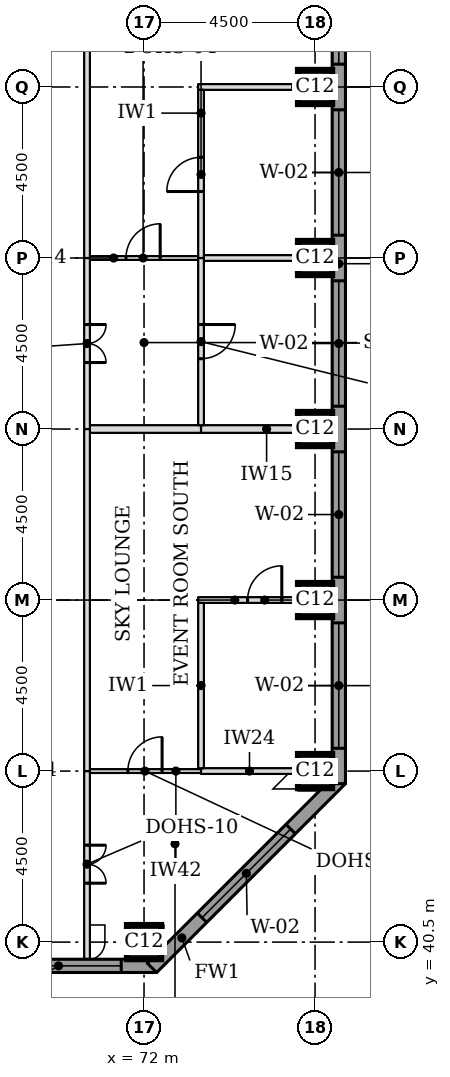
"""IFC4 building model, lengths in metres.
Left out: names, types, materials, properties, quantities, classifications, styles, units other than length and angle.
Written with IfcOpenShell. Run it as: python <this file> out.ifc"""

import sys

from ifc_helpers import new_model, si_unit, direction, frame, frame_2d, origin, origin_2d, place, context, subcontext, project, spatial, rectangle, extrude, element, fill, save


model = new_model("IFC4")
c1 = context("Model", 3, precision=1e-05, world=origin(), true_north=direction((0.0, 1.0)))
c2 = subcontext(c1, "Body", "Model", "MODEL_VIEW")
j1 = project(units=[si_unit("LENGTHUNIT", "METRE"), si_unit("PLANEANGLEUNIT", "RADIAN")], contexts=[c1])
p1 = place(None, origin())
s1 = spatial("IfcSite", under=j1, at=p1, CompositionType="ELEMENT")
p2 = place(p1, origin())
s2 = spatial("IfcBuilding", under=s1, at=p2, CompositionType="ELEMENT")
p3 = place(p2, frame((0.0, 0.0, 260.0)))
s3 = spatial("IfcBuildingStorey", under=s2, at=p3, CompositionType="ELEMENT", Elevation=260.0)
for number, where, z_axis, x_axis in (
    (1, (72.0, 40.5, 0.0), (0.0, 0.0, 1.0), (1.0, 0.0, 0.0)),
    (2, (76.5, 45.0, 0.0), (0.0, 0.0, 1.0), (1.0, 0.0, 0.0)),
    (3, (76.5, 49.5, 0.0), (0.0, 0.0, 1.0), (1.0, 0.0, 0.0)),
    (4, (76.5, 54.0, 0.0), (0.0, 0.0, 1.0), (1.0, 0.0, 0.0)),
    (5, (76.5, 58.5, 0.0), (0.0, 0.0, 1.0), (1.0, 0.0, 0.0)),
    (6, (76.5, 63.0, 0.0), (0.0, 0.0, 1.0), (1.0, 0.0, 0.0)),
):
    element("IfcColumn", number, at=place(p3, frame(where, z_axis=z_axis, x_axis=x_axis)), inside=s3, PredefinedType="COLUMN", context=c2, shape_type="SweptSolid", body=[
        extrude(rectangle(XDim=0.9, YDim=0.9, at=origin_2d()), origin(), (0.0, 0.0, 1.0), 3.7),
    ])
p4 = place(p3, frame((36.0, 39.875, 0.0), z_axis=(0.0, 0.0, 1.0), x_axis=(1.0, 0.0, 0.0)))
e7 = element("IfcWall", 7, at=p4, inside=s3, PredefinedType="STANDARD", context=c2, shape_type="SweptSolid", body=[
    extrude(rectangle(XDim=36.331, YDim=0.35, at=frame_2d((18.166, 0.0))), origin(), (0.0, 0.0, 1.0), 3.425),
])
p5 = place(p4, frame((0.6, 0.0, 0.9)))
e8 = element("IfcOpeningElement", 8, at=p5, cuts=e7, PredefinedType="OPENING", context=c2, shape_type="SweptSolid", body=[
    extrude(rectangle(XDim=3.3, YDim=1.9, at=frame_2d((1.65, 0.95))), frame((0.0, 0.185, 0.0), z_axis=(0.0, -1.0, 0.0), x_axis=(1.0, 0.0, 0.0)), (0.0, 0.0, 1.0), 0.37),
])
p6 = place(p4, frame((5.1, 0.0, 0.9)))
e9 = element("IfcOpeningElement", 9, at=p6, cuts=e7, PredefinedType="OPENING", context=c2, shape_type="SweptSolid", body=[
    extrude(rectangle(XDim=3.3, YDim=1.9, at=frame_2d((1.65, 0.95))), frame((0.0, 0.185, 0.0), z_axis=(0.0, -1.0, 0.0), x_axis=(1.0, 0.0, 0.0)), (0.0, 0.0, 1.0), 0.37),
])
p7 = place(p4, frame((9.6, 0.0, 0.9)))
e10 = element("IfcOpeningElement", 10, at=p7, cuts=e7, PredefinedType="OPENING", context=c2, shape_type="SweptSolid", body=[
    extrude(rectangle(XDim=3.3, YDim=1.9, at=frame_2d((1.65, 0.95))), frame((0.0, 0.185, 0.0), z_axis=(0.0, -1.0, 0.0), x_axis=(1.0, 0.0, 0.0)), (0.0, 0.0, 1.0), 0.37),
])
p8 = place(p4, frame((14.1, 0.0, 0.9)))
e11 = element("IfcOpeningElement", 11, at=p8, cuts=e7, PredefinedType="OPENING", context=c2, shape_type="SweptSolid", body=[
    extrude(rectangle(XDim=3.3, YDim=1.9, at=frame_2d((1.65, 0.95))), frame((0.0, 0.185, 0.0), z_axis=(0.0, -1.0, 0.0), x_axis=(1.0, 0.0, 0.0)), (0.0, 0.0, 1.0), 0.37),
])
p9 = place(p4, frame((18.6, 0.0, 0.9)))
e12 = element("IfcOpeningElement", 12, at=p9, cuts=e7, PredefinedType="OPENING", context=c2, shape_type="SweptSolid", body=[
    extrude(rectangle(XDim=3.3, YDim=1.9, at=frame_2d((1.65, 0.95))), frame((0.0, 0.185, 0.0), z_axis=(0.0, -1.0, 0.0), x_axis=(1.0, 0.0, 0.0)), (0.0, 0.0, 1.0), 0.37),
])
p10 = place(p4, frame((23.1, 0.0, 0.9)))
e13 = element("IfcOpeningElement", 13, at=p10, cuts=e7, PredefinedType="OPENING", context=c2, shape_type="SweptSolid", body=[
    extrude(rectangle(XDim=3.3, YDim=1.9, at=frame_2d((1.65, 0.95))), frame((0.0, 0.185, 0.0), z_axis=(0.0, -1.0, 0.0), x_axis=(1.0, 0.0, 0.0)), (0.0, 0.0, 1.0), 0.37),
])
p11 = place(p4, frame((27.6, 0.0, 0.9)))
e14 = element("IfcOpeningElement", 14, at=p11, cuts=e7, PredefinedType="OPENING", context=c2, shape_type="SweptSolid", body=[
    extrude(rectangle(XDim=3.3, YDim=1.9, at=frame_2d((1.65, 0.95))), frame((0.0, 0.185, 0.0), z_axis=(0.0, -1.0, 0.0), x_axis=(1.0, 0.0, 0.0)), (0.0, 0.0, 1.0), 0.37),
])
p12 = place(p4, frame((32.1, 0.0, 0.9)))
e15 = element("IfcOpeningElement", 15, at=p12, cuts=e7, PredefinedType="OPENING", context=c2, shape_type="SweptSolid", body=[
    extrude(rectangle(XDim=3.3, YDim=1.9, at=frame_2d((1.65, 0.95))), frame((0.0, 0.185, 0.0), z_axis=(0.0, -1.0, 0.0), x_axis=(1.0, 0.0, 0.0)), (0.0, 0.0, 1.0), 0.37),
])
p13 = place(p3, frame((72.208, 39.824, 0.0), z_axis=(0.0, 0.0, 1.0), x_axis=(0.707106781187, 0.707106781187, 0.0)))
e16 = element("IfcWall", 16, at=p13, inside=s3, PredefinedType="STANDARD", context=c2, shape_type="SweptSolid", body=[
    extrude(rectangle(XDim=7.027, YDim=0.35, at=frame_2d((3.513, 0.0))), origin(), (0.0, 0.0, 1.0), 3.425),
])
p14 = place(p13, frame((1.863, 0.0, 0.9)))
e17 = element("IfcOpeningElement", 17, at=p14, cuts=e16, PredefinedType="OPENING", context=c2, shape_type="SweptSolid", body=[
    extrude(rectangle(XDim=3.3, YDim=1.9, at=frame_2d((1.65, 0.95))), frame((0.0, 0.185, 0.0), z_axis=(0.0, -1.0, 0.0), x_axis=(1.0, 0.0, 0.0)), (0.0, 0.0, 1.0), 0.37),
])
p15 = place(p3, frame((77.125, 44.669, 0.0), z_axis=(0.0, 0.0, 1.0), x_axis=(0.0, 1.0, 0.0)))
e18 = element("IfcWall", 18, at=p15, inside=s3, PredefinedType="STANDARD", context=c2, shape_type="SweptSolid", body=[
    extrude(rectangle(XDim=32.163, YDim=0.35, at=frame_2d((16.081, 0.0))), origin(), (0.0, 0.0, 1.0), 3.425),
])
p16 = place(p15, frame((0.931, 0.0, 0.9)))
e19 = element("IfcOpeningElement", 19, at=p16, cuts=e18, PredefinedType="OPENING", context=c2, shape_type="SweptSolid", body=[
    extrude(rectangle(XDim=3.3, YDim=1.9, at=frame_2d((1.65, 0.95))), frame((0.0, 0.185, 0.0), z_axis=(0.0, -1.0, 0.0), x_axis=(1.0, 0.0, 0.0)), (0.0, 0.0, 1.0), 0.37),
])
p17 = place(p15, frame((5.431, 0.0, 0.9)))
e20 = element("IfcOpeningElement", 20, at=p17, cuts=e18, PredefinedType="OPENING", context=c2, shape_type="SweptSolid", body=[
    extrude(rectangle(XDim=3.3, YDim=1.9, at=frame_2d((1.65, 0.95))), frame((0.0, 0.185, 0.0), z_axis=(0.0, -1.0, 0.0), x_axis=(1.0, 0.0, 0.0)), (0.0, 0.0, 1.0), 0.37),
])
p18 = place(p15, frame((9.931, 0.0, 0.9)))
e21 = element("IfcOpeningElement", 21, at=p18, cuts=e18, PredefinedType="OPENING", context=c2, shape_type="SweptSolid", body=[
    extrude(rectangle(XDim=3.3, YDim=1.9, at=frame_2d((1.65, 0.95))), frame((0.0, 0.185, 0.0), z_axis=(0.0, -1.0, 0.0), x_axis=(1.0, 0.0, 0.0)), (0.0, 0.0, 1.0), 0.37),
])
p19 = place(p15, frame((14.431, 0.0, 0.9)))
e22 = element("IfcOpeningElement", 22, at=p19, cuts=e18, PredefinedType="OPENING", context=c2, shape_type="SweptSolid", body=[
    extrude(rectangle(XDim=3.3, YDim=1.9, at=frame_2d((1.65, 0.95))), frame((0.0, 0.185, 0.0), z_axis=(0.0, -1.0, 0.0), x_axis=(1.0, 0.0, 0.0)), (0.0, 0.0, 1.0), 0.37),
])
p20 = place(p15, frame((18.931, 0.0, 0.9)))
e23 = element("IfcOpeningElement", 23, at=p20, cuts=e18, PredefinedType="OPENING", context=c2, shape_type="SweptSolid", body=[
    extrude(rectangle(XDim=3.3, YDim=1.9, at=frame_2d((1.65, 0.95))), frame((0.0, 0.185, 0.0), z_axis=(0.0, -1.0, 0.0), x_axis=(1.0, 0.0, 0.0)), (0.0, 0.0, 1.0), 0.37),
])
p21 = place(p15, frame((23.431, 0.0, 0.9)))
e24 = element("IfcOpeningElement", 24, at=p21, cuts=e18, PredefinedType="OPENING", context=c2, shape_type="SweptSolid", body=[
    extrude(rectangle(XDim=3.3, YDim=1.9, at=frame_2d((1.65, 0.95))), frame((0.0, 0.185, 0.0), z_axis=(0.0, -1.0, 0.0), x_axis=(1.0, 0.0, 0.0)), (0.0, 0.0, 1.0), 0.37),
])
p22 = place(p15, frame((27.931, 0.0, 0.9)))
e25 = element("IfcOpeningElement", 25, at=p22, cuts=e18, PredefinedType="OPENING", context=c2, shape_type="SweptSolid", body=[
    extrude(rectangle(XDim=3.3, YDim=1.9, at=frame_2d((1.65, 0.95))), frame((0.0, 0.185, 0.0), z_axis=(0.0, -1.0, 0.0), x_axis=(1.0, 0.0, 0.0)), (0.0, 0.0, 1.0), 0.37),
])
p23 = place(p3, frame((70.575, 45.0, 0.0), z_axis=(0.0, 0.0, 1.0), x_axis=(1.0, 0.0, 0.0)))
e26 = element("IfcWall", 26, at=p23, inside=s3, PredefinedType="PARTITIONING", context=c2, shape_type="SweptSolid", body=[
    extrude(rectangle(XDim=2.925, YDim=0.1, at=frame_2d((1.462, 0.0))), origin(), (0.0, 0.0, 1.0), 3.047),
])
p24 = place(p23, frame((1.0, 0.0, 0.0)))
e27 = element("IfcOpeningElement", 27, at=p24, cuts=e26, PredefinedType="OPENING", context=c2, shape_type="SweptSolid", body=[
    extrude(rectangle(XDim=0.9, YDim=2.1, at=frame_2d((0.45, 1.05))), frame((0.0, 0.06, 0.0), z_axis=(0.0, -1.0, 0.0), x_axis=(1.0, 0.0, 0.0)), (0.0, 0.0, 1.0), 0.12),
])
p25 = place(p3, frame((73.5, 45.0, 0.0), z_axis=(0.0, 0.0, 1.0), x_axis=(1.0, 0.0, 0.0)))
e28 = element("IfcWall", 28, at=p25, inside=s3, PredefinedType="PARTITIONING", context=c2, shape_type="SweptSolid", body=[
    extrude(rectangle(XDim=2.55, YDim=0.15, at=frame_2d((1.275, 0.0))), origin(), (0.0, 0.0, 1.0), 3.047),
])
p26 = place(p3, frame((73.425, 49.5, 0.0), z_axis=(0.0, 0.0, 1.0), x_axis=(1.0, 0.0, 0.0)))
e29 = element("IfcWall", 29, at=p26, inside=s3, PredefinedType="PARTITIONING", context=c2, shape_type="SweptSolid", body=[
    extrude(rectangle(XDim=3.525, YDim=0.15, at=frame_2d((1.762, 0.0))), origin(), (0.0, 0.0, 1.0), 3.45),
])
p27 = place(p26, frame((1.3, 0.0, 0.0)))
e30 = element("IfcOpeningElement", 30, at=p27, cuts=e29, PredefinedType="OPENING", context=c2, shape_type="SweptSolid", body=[
    extrude(rectangle(XDim=0.9, YDim=2.1, at=frame_2d((0.45, 1.05))), frame((0.0, 0.085, 0.0), z_axis=(0.0, -1.0, 0.0), x_axis=(1.0, 0.0, 0.0)), (0.0, 0.0, 1.0), 0.17),
])
p28 = place(p3, frame((70.575, 54.0, 0.0), z_axis=(0.0, 0.0, 1.0), x_axis=(1.0, 0.0, 0.0)))
e31 = element("IfcWall", 31, at=p28, inside=s3, PredefinedType="PARTITIONING", context=c2, shape_type="SweptSolid", body=[
    extrude(rectangle(XDim=2.925, YDim=0.2, at=frame_2d((1.462, 0.0))), origin(), (0.0, 0.0, 1.0), 3.45),
])
p29 = place(p3, frame((73.5, 54.0, 0.0), z_axis=(0.0, 0.0, 1.0), x_axis=(1.0, 0.0, 0.0)))
e32 = element("IfcWall", 32, at=p29, inside=s3, PredefinedType="PARTITIONING", context=c2, shape_type="SweptSolid", body=[
    extrude(rectangle(XDim=3.45, YDim=0.2, at=frame_2d((1.725, 0.0))), origin(), (0.0, 0.0, 1.0), 3.45),
])
p30 = place(p3, frame((70.575, 58.5, 0.0), z_axis=(0.0, 0.0, 1.0), x_axis=(1.0, 0.0, 0.0)))
e33 = element("IfcWall", 33, at=p30, inside=s3, PredefinedType="PARTITIONING", context=c2, shape_type="SweptSolid", body=[
    extrude(rectangle(XDim=2.85, YDim=0.1, at=frame_2d((1.425, 0.0))), origin(), (0.0, 0.0, 1.0), 3.45),
])
p31 = place(p30, frame((0.95, 0.0, 0.0)))
e34 = element("IfcOpeningElement", 34, at=p31, cuts=e33, PredefinedType="OPENING", context=c2, shape_type="SweptSolid", body=[
    extrude(rectangle(XDim=0.9, YDim=2.1, at=frame_2d((0.45, 1.05))), frame((0.0, 0.06, 0.0), z_axis=(0.0, -1.0, 0.0), x_axis=(1.0, 0.0, 0.0)), (0.0, 0.0, 1.0), 0.12),
])
p32 = place(p3, frame((73.575, 58.5, 0.0), z_axis=(0.0, 0.0, 1.0), x_axis=(1.0, 0.0, 0.0)))
e35 = element("IfcWall", 35, at=p32, inside=s3, PredefinedType="PARTITIONING", context=c2, shape_type="SweptSolid", body=[
    extrude(rectangle(XDim=3.375, YDim=0.15, at=frame_2d((1.688, 0.0))), origin(), (0.0, 0.0, 1.0), 3.45),
])
p33 = place(p3, frame((73.425, 63.0, 0.0), z_axis=(0.0, 0.0, 1.0), x_axis=(1.0, 0.0, 0.0)))
e36 = element("IfcWall", 36, at=p33, inside=s3, PredefinedType="PARTITIONING", context=c2, shape_type="SweptSolid", body=[
    extrude(rectangle(XDim=3.525, YDim=0.15, at=frame_2d((1.762, 0.0))), origin(), (0.0, 0.0, 1.0), 3.45),
])
p34 = place(p3, frame((70.5, 40.05, 0.0), z_axis=(0.0, 0.0, 1.0), x_axis=(0.0, 1.0, 0.0)))
e37 = element("IfcWall", 37, at=p34, inside=s3, PredefinedType="PARTITIONING", context=c2, shape_type="SweptSolid", body=[
    extrude(rectangle(XDim=4.95, YDim=0.15, at=frame_2d((2.475, 0.0))), origin(), (0.0, 0.0, 1.0), 3.45),
])
p35 = place(p34, frame((2.0, 0.0, 0.0)))
e38 = element("IfcOpeningElement", 38, at=p35, cuts=e37, PredefinedType="OPENING", context=c2, shape_type="SweptSolid", body=[
    extrude(rectangle(XDim=1.0, YDim=2.1, at=frame_2d((0.5, 1.05))), frame((0.0, 0.085, 0.0), z_axis=(0.0, -1.0, 0.0), x_axis=(1.0, 0.0, 0.0)), (0.0, 0.0, 1.0), 0.17),
])
p36 = place(p3, frame((70.5, 45.0, 0.0), z_axis=(0.0, 0.0, 1.0), x_axis=(0.0, 1.0, 0.0)))
e39 = element("IfcWall", 39, at=p36, inside=s3, PredefinedType="PARTITIONING", context=c2, shape_type="SweptSolid", body=[
    extrude(rectangle(XDim=9.0, YDim=0.15, at=frame_2d((4.5, 0.0))), origin(), (0.0, 0.0, 1.0), 3.45),
])
p37 = place(p3, frame((73.5, 45.075, 0.0), z_axis=(0.0, 0.0, 1.0), x_axis=(0.0, 1.0, 0.0)))
e40 = element("IfcWall", 40, at=p37, inside=s3, PredefinedType="PARTITIONING", context=c2, shape_type="SweptSolid", body=[
    extrude(rectangle(XDim=4.35, YDim=0.15, at=frame_2d((2.175, 0.0))), origin(), (0.0, 0.0, 1.0), 3.45),
])
p38 = place(p3, frame((70.5, 54.0, 0.0), z_axis=(0.0, 0.0, 1.0), x_axis=(0.0, 1.0, 0.0)))
e41 = element("IfcWall", 41, at=p38, inside=s3, PredefinedType="PARTITIONING", context=c2, shape_type="SweptSolid", body=[
    extrude(rectangle(XDim=4.5, YDim=0.15, at=frame_2d((2.25, 0.0))), origin(), (0.0, 0.0, 1.0), 3.45),
])
p39 = place(p38, frame((1.75, 0.0, 0.0)))
e42 = element("IfcOpeningElement", 42, at=p39, cuts=e41, PredefinedType="OPENING", context=c2, shape_type="SweptSolid", body=[
    extrude(rectangle(XDim=1.0, YDim=2.1, at=frame_2d((0.5, 1.05))), frame((0.0, 0.085, 0.0), z_axis=(0.0, -1.0, 0.0), x_axis=(1.0, 0.0, 0.0)), (0.0, 0.0, 1.0), 0.17),
])
p40 = place(p3, frame((73.5, 54.1, 0.0), z_axis=(0.0, 0.0, 1.0), x_axis=(0.0, 1.0, 0.0)))
e43 = element("IfcWall", 43, at=p40, inside=s3, PredefinedType="PARTITIONING", context=c2, shape_type="SweptSolid", body=[
    extrude(rectangle(XDim=4.4, YDim=0.15, at=frame_2d((2.2, 0.0))), origin(), (0.0, 0.0, 1.0), 3.45),
])
p41 = place(p40, frame((1.75, 0.0, 0.0)))
e44 = element("IfcOpeningElement", 44, at=p41, cuts=e43, PredefinedType="OPENING", context=c2, shape_type="SweptSolid", body=[
    extrude(rectangle(XDim=0.9, YDim=2.1, at=frame_2d((0.45, 1.05))), frame((0.0, 0.085, 0.0), z_axis=(0.0, -1.0, 0.0), x_axis=(1.0, 0.0, 0.0)), (0.0, 0.0, 1.0), 0.17),
])
p42 = place(p3, frame((70.5, 58.5, 0.0), z_axis=(0.0, 0.0, 1.0), x_axis=(0.0, 1.0, 0.0)))
e45 = element("IfcWall", 45, at=p42, inside=s3, PredefinedType="PARTITIONING", context=c2, shape_type="SweptSolid", body=[
    extrude(rectangle(XDim=22.95, YDim=0.15, at=frame_2d((11.475, 0.0))), origin(), (0.0, 0.0, 1.0), 3.45),
])
p43 = place(p3, frame((73.5, 58.5, 0.0), z_axis=(0.0, 0.0, 1.0), x_axis=(0.0, 1.0, 0.0)))
e46 = element("IfcWall", 46, at=p43, inside=s3, PredefinedType="PARTITIONING", context=c2, shape_type="SweptSolid", body=[
    extrude(rectangle(XDim=4.425, YDim=0.15, at=frame_2d((2.212, 0.0))), origin(), (0.0, 0.0, 1.0), 3.45),
])
p44 = place(p43, frame((1.75, 0.0, 0.0)))
e47 = element("IfcOpeningElement", 47, at=p44, cuts=e46, PredefinedType="OPENING", context=c2, shape_type="SweptSolid", body=[
    extrude(rectangle(XDim=0.9, YDim=2.1, at=frame_2d((0.45, 1.05))), frame((0.0, 0.085, 0.0), z_axis=(0.0, -1.0, 0.0), x_axis=(1.0, 0.0, 0.0)), (0.0, 0.0, 1.0), 0.17),
])
p45 = place(p12, origin())
e48 = element("IfcWindow", 48, at=p45, inside=s3, PartitioningType="SINGLE_PANEL", PredefinedType="WINDOW", context=c2, shape_type="SweptSolid", body=[
    extrude(rectangle(XDim=3.3, YDim=1.9, at=frame_2d((1.65, 0.95))), frame((0.0, 0.085, 0.0), z_axis=(0.0, -1.0, 0.0), x_axis=(1.0, 0.0, 0.0)), (0.0, 0.0, 1.0), 0.06),
])
fill(e15, e48)
p46 = place(p14, origin())
e49 = element("IfcWindow", 49, at=p46, inside=s3, PartitioningType="SINGLE_PANEL", PredefinedType="WINDOW", context=c2, shape_type="SweptSolid", body=[
    extrude(rectangle(XDim=3.3, YDim=1.9, at=frame_2d((1.65, 0.95))), frame((0.0, 0.085, 0.0), z_axis=(0.0, -1.0, 0.0), x_axis=(1.0, 0.0, 0.0)), (0.0, 0.0, 1.0), 0.06),
])
fill(e17, e49)
p47 = place(p16, origin())
e50 = element("IfcWindow", 50, at=p47, inside=s3, PartitioningType="SINGLE_PANEL", PredefinedType="WINDOW", context=c2, shape_type="SweptSolid", body=[
    extrude(rectangle(XDim=3.3, YDim=1.9, at=frame_2d((1.65, 0.95))), frame((0.0, 0.085, 0.0), z_axis=(0.0, -1.0, 0.0), x_axis=(1.0, 0.0, 0.0)), (0.0, 0.0, 1.0), 0.06),
])
fill(e19, e50)
p48 = place(p17, origin())
e51 = element("IfcWindow", 51, at=p48, inside=s3, PartitioningType="SINGLE_PANEL", PredefinedType="WINDOW", context=c2, shape_type="SweptSolid", body=[
    extrude(rectangle(XDim=3.3, YDim=1.9, at=frame_2d((1.65, 0.95))), frame((0.0, 0.085, 0.0), z_axis=(0.0, -1.0, 0.0), x_axis=(1.0, 0.0, 0.0)), (0.0, 0.0, 1.0), 0.06),
])
fill(e20, e51)
p49 = place(p18, origin())
e52 = element("IfcWindow", 52, at=p49, inside=s3, PartitioningType="SINGLE_PANEL", PredefinedType="WINDOW", context=c2, shape_type="SweptSolid", body=[
    extrude(rectangle(XDim=3.3, YDim=1.9, at=frame_2d((1.65, 0.95))), frame((0.0, 0.085, 0.0), z_axis=(0.0, -1.0, 0.0), x_axis=(1.0, 0.0, 0.0)), (0.0, 0.0, 1.0), 0.06),
])
fill(e21, e52)
p50 = place(p19, origin())
e53 = element("IfcWindow", 53, at=p50, inside=s3, PartitioningType="SINGLE_PANEL", PredefinedType="WINDOW", context=c2, shape_type="SweptSolid", body=[
    extrude(rectangle(XDim=3.3, YDim=1.9, at=frame_2d((1.65, 0.95))), frame((0.0, 0.085, 0.0), z_axis=(0.0, -1.0, 0.0), x_axis=(1.0, 0.0, 0.0)), (0.0, 0.0, 1.0), 0.06),
])
fill(e22, e53)
p51 = place(p20, origin())
e54 = element("IfcWindow", 54, at=p51, inside=s3, PartitioningType="SINGLE_PANEL", PredefinedType="WINDOW", context=c2, shape_type="SweptSolid", body=[
    extrude(rectangle(XDim=3.3, YDim=1.9, at=frame_2d((1.65, 0.95))), frame((0.0, 0.085, 0.0), z_axis=(0.0, -1.0, 0.0), x_axis=(1.0, 0.0, 0.0)), (0.0, 0.0, 1.0), 0.06),
])
fill(e23, e54)
p52 = place(p35, frame((1.0, 0.0, 0.0), z_axis=(0.0, 0.0, 1.0), x_axis=(-1.0, 0.0, 0.0)))
e55 = element("IfcDoor", 55, at=p52, inside=s3, OperationType="DOUBLE_DOOR_SINGLE_SWING", PredefinedType="DOOR", context=c2, shape_type="SweptSolid", body=[
    extrude(rectangle(XDim=1.0, YDim=2.1, at=frame_2d((0.5, 1.05))), frame((0.0, 0.025, 0.0), z_axis=(0.0, -1.0, 0.0), x_axis=(1.0, 0.0, 0.0)), (0.0, 0.0, 1.0), 0.05),
])
fill(e38, e55)
p53 = place(p24, origin())
e56 = element("IfcDoor", 56, at=p53, inside=s3, OperationType="SINGLE_SWING_RIGHT", PredefinedType="DOOR", context=c2, shape_type="SweptSolid", body=[
    extrude(rectangle(XDim=0.9, YDim=2.1, at=frame_2d((0.45, 1.05))), frame((0.0, 0.025, 0.0), z_axis=(0.0, -1.0, 0.0), x_axis=(1.0, 0.0, 0.0)), (0.0, 0.0, 1.0), 0.05),
])
fill(e27, e56)
p54 = place(p27, origin())
e57 = element("IfcDoor", 57, at=p54, inside=s3, OperationType="SINGLE_SWING_RIGHT", PredefinedType="DOOR", context=c2, shape_type="SweptSolid", body=[
    extrude(rectangle(XDim=0.9, YDim=2.1, at=frame_2d((0.45, 1.05))), frame((0.0, 0.025, 0.0), z_axis=(0.0, -1.0, 0.0), x_axis=(1.0, 0.0, 0.0)), (0.0, 0.0, 1.0), 0.05),
])
fill(e30, e57)
p55 = place(p39, frame((1.0, 0.0, 0.0), z_axis=(0.0, 0.0, 1.0), x_axis=(-1.0, 0.0, 0.0)))
e58 = element("IfcDoor", 58, at=p55, inside=s3, OperationType="DOUBLE_DOOR_SINGLE_SWING", PredefinedType="DOOR", context=c2, shape_type="SweptSolid", body=[
    extrude(rectangle(XDim=1.0, YDim=2.1, at=frame_2d((0.5, 1.05))), frame((0.0, 0.025, 0.0), z_axis=(0.0, -1.0, 0.0), x_axis=(1.0, 0.0, 0.0)), (0.0, 0.0, 1.0), 0.05),
])
fill(e42, e58)
p56 = place(p31, origin())
e59 = element("IfcDoor", 59, at=p56, inside=s3, OperationType="SINGLE_SWING_RIGHT", PredefinedType="DOOR", context=c2, shape_type="SweptSolid", body=[
    extrude(rectangle(XDim=0.9, YDim=2.1, at=frame_2d((0.45, 1.05))), frame((0.0, 0.025, 0.0), z_axis=(0.0, -1.0, 0.0), x_axis=(1.0, 0.0, 0.0)), (0.0, 0.0, 1.0), 0.05),
])
fill(e34, e59)
p57 = place(p41, frame((0.9, 0.0, 0.0), z_axis=(0.0, 0.0, 1.0), x_axis=(-1.0, 0.0, 0.0)))
e60 = element("IfcDoor", 60, at=p57, inside=s3, OperationType="SINGLE_SWING_LEFT", PredefinedType="DOOR", context=c2, shape_type="SweptSolid", body=[
    extrude(rectangle(XDim=0.9, YDim=2.1, at=frame_2d((0.45, 1.05))), frame((0.0, 0.025, 0.0), z_axis=(0.0, -1.0, 0.0), x_axis=(1.0, 0.0, 0.0)), (0.0, 0.0, 1.0), 0.05),
])
fill(e44, e60)
p58 = place(p44, origin())
e61 = element("IfcDoor", 61, at=p58, inside=s3, OperationType="SINGLE_SWING_LEFT", PredefinedType="DOOR", context=c2, shape_type="SweptSolid", body=[
    extrude(rectangle(XDim=0.9, YDim=2.1, at=frame_2d((0.45, 1.05))), frame((0.0, 0.025, 0.0), z_axis=(0.0, -1.0, 0.0), x_axis=(1.0, 0.0, 0.0)), (0.0, 0.0, 1.0), 0.05),
])
fill(e47, e61)
save(model, sys.argv[1])
